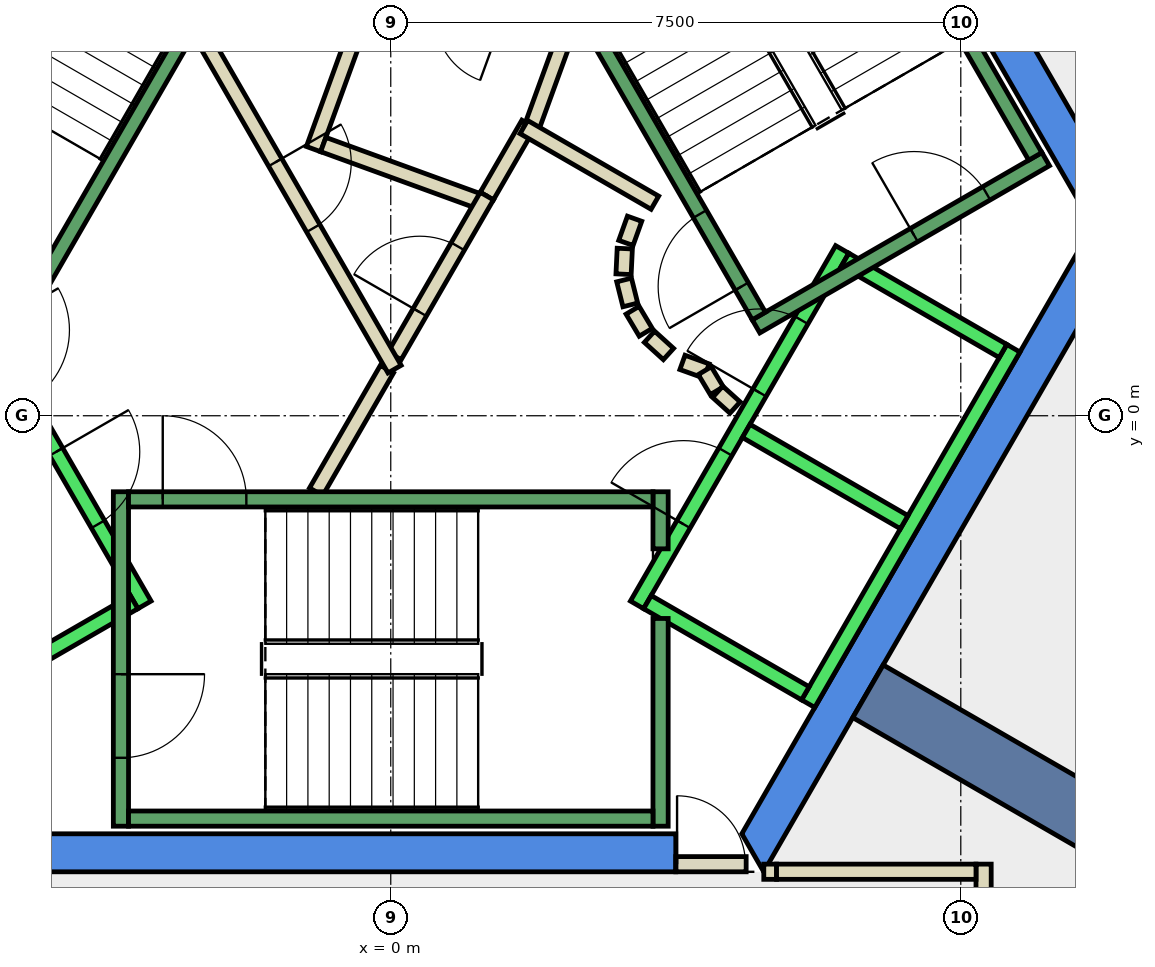
"""IFC4 building model, lengths in metres.
Left out: names, types, materials, properties, quantities, classifications, styles, units other than length and angle.
Written with IfcOpenShell. Run it as: python <this file> out.ifc"""

import sys

from ifc_helpers import new_model, si_unit, direction, frame, frame_2d, origin, place, context, subcontext, project, spatial, polyline, rectangle, outline, extrude, element, fill, save


model = new_model("IFC4")
c1 = context("Model", 3, precision=1e-05, world=origin(), true_north=direction((0.0, 1.0)))
c2 = subcontext(c1, "Body", "Model", "MODEL_VIEW")
j1 = project(units=[si_unit("LENGTHUNIT", "METRE"), si_unit("PLANEANGLEUNIT", "RADIAN")], contexts=[c1])
p1 = place(None, origin())
s1 = spatial("IfcSite", under=j1, at=p1, CompositionType="ELEMENT")
p2 = place(p1, origin())
s2 = spatial("IfcBuilding", under=s1, at=p2, CompositionType="ELEMENT")
p3 = place(p2, frame((0.0, 0.0, 293.6)))
s3 = spatial("IfcBuildingStorey", under=s2, at=p3, CompositionType="ELEMENT", Elevation=293.6)
p4 = place(p3, frame((0.0, 0.0, -0.34)))
e1 = element("IfcWall", 1, at=p4, inside=s3, PredefinedType="SHEAR", context=c2, shape_type="SweptSolid", body=[
    extrude(outline(polyline([(5.486, 9.998), (5.053, 9.748), (9.238, 2.5), (9.815, 2.5), (5.486, 9.998)])), origin(), (0.0, 0.0, 1.0), 3.6),
])
p5 = place(p3, frame((0.0, 0.0, -0.34)))
e2 = element("IfcWall", 2, at=p5, inside=s3, PredefinedType="SHEAR", context=c2, shape_type="SweptSolid", body=[
    extrude(outline(polyline([(3.75, -6.0), (3.75, -5.5), (-4.619, -5.5), (-4.907, -6.0), (3.75, -6.0)])), origin(), (0.0, 0.0, 1.0), 3.6),
])
p6 = place(p3, frame((0.0, 0.0, -0.34)))
e3 = element("IfcWall", 3, at=p6, inside=s3, PredefinedType="SHEAR", context=c2, shape_type="SweptSolid", body=[
    extrude(outline(polyline([(4.907, -6.0), (9.815, 2.5), (9.238, 2.5), (4.619, -5.5), (4.907, -6.0)])), origin(), (0.0, 0.0, 1.0), 3.6),
])
p7 = place(p3, frame((6.279, -3.625, -0.34), z_axis=(0.0, 0.0, 1.0), x_axis=(0.866017533419, -0.500013631625, 0.0)))
e4 = element("IfcWall", 4, at=p7, inside=s3, PredefinedType="SHEAR", context=c2, shape_type="SweptSolid", body=[
    extrude(rectangle(XDim=9.0, YDim=0.8, at=frame_2d((4.5, 0.0))), origin(), (0.0, 0.0, 1.0), 3.6),
])
p8 = place(p3, frame((1.264, 2.89, 0.0), z_axis=(0.0, 0.0, 1.0), x_axis=(0.500043792738, 0.866000118559, 0.0)))
e5 = element("IfcWall", 5, at=p8, inside=s3, PredefinedType="PARTITIONING", context=c2, shape_type="SweptSolid", body=[
    extrude(rectangle(XDim=1.096, YDim=0.2, at=frame_2d((0.548, 0.0))), origin(), (0.0, 0.0, 1.0), 3.26),
])
p9 = place(p3, frame((1.838, 3.748, 0.0), z_axis=(0.0, 0.0, 1.0), x_axis=(0.342266462435, 0.939602931398, 0.0)))
e6 = element("IfcWall", 6, at=p9, inside=s3, PredefinedType="PARTITIONING", context=c2, shape_type="SweptSolid", body=[
    extrude(rectangle(XDim=1.198, YDim=0.2, at=frame_2d((0.599, 0.0))), origin(), (0.0, 0.0, 1.0), 3.26),
])
p10 = place(p3, frame((-0.196, 5.764, 0.0), z_axis=(0.0, 0.0, 1.0), x_axis=(-0.34165322761, -0.939826086073, 0.0)))
e7 = element("IfcWall", 7, at=p10, inside=s3, PredefinedType="PARTITIONING", context=c2, shape_type="SweptSolid", body=[
    extrude(rectangle(XDim=2.4, YDim=0.2, at=frame_2d((1.2, 0.0))), origin(), (0.0, 0.0, 1.0), 3.26),
])
p11 = place(p3, frame((-0.888, 3.568, 0.0), z_axis=(0.0, 0.0, 1.0), x_axis=(0.939685034098, -0.34204098686, 0.0)))
e8 = element("IfcWall", 8, at=p11, inside=s3, PredefinedType="PARTITIONING", context=c2, shape_type="SweptSolid", body=[
    extrude(rectangle(XDim=2.237, YDim=0.2, at=frame_2d((1.119, 0.0))), origin(), (0.0, 0.0, 1.0), 3.26),
])
p12 = place(p3, frame((-0.982, -1.0, 0.0), z_axis=(0.0, 0.0, 1.0), x_axis=(0.50024047865, 0.865886518847, 0.0)))
e9 = element("IfcWall", 9, at=p12, inside=s3, PredefinedType="PARTITIONING", context=c2, shape_type="SweptSolid", body=[
    extrude(rectangle(XDim=1.863, YDim=0.2, at=frame_2d((0.931, 0.0))), origin(), (0.0, 0.0, 1.0), 3.26),
])
p13 = place(p3, frame((0.05, 0.787, 0.0), z_axis=(0.0, 0.0, 1.0), x_axis=(0.499945861543, 0.866056658381, 0.0)))
e10 = element("IfcWall", 10, at=p13, inside=s3, PredefinedType="PARTITIONING", context=c2, shape_type="SweptSolid", body=[
    extrude(rectangle(XDim=2.428, YDim=0.2, at=frame_2d((1.214, 0.0))), origin(), (0.0, 0.0, 1.0), 3.26),
])
p14 = place(p13, frame((0.664, 0.0, 0.0)))
e11 = element("IfcOpeningElement", 11, at=p14, cuts=e10, PredefinedType="OPENING", context=c2, shape_type="SweptSolid", body=[
    extrude(rectangle(XDim=1.0, YDim=2.1, at=frame_2d((0.5, 1.05))), frame((0.0, 0.11, 0.0), z_axis=(0.0, -1.0, 0.0), x_axis=(1.0, 0.0, 0.0)), (0.0, 0.0, 1.0), 0.22),
])
p15 = place(p3, frame((1.751, 3.798, 0.0), z_axis=(0.0, 0.0, 1.0), x_axis=(0.866091650241, -0.499885240213, 0.0)))
e12 = element("IfcWall", 12, at=p15, inside=s3, PredefinedType="PARTITIONING", context=c2, shape_type="SweptSolid", body=[
    extrude(rectangle(XDim=1.991, YDim=0.2, at=frame_2d((0.995, 0.0))), origin(), (0.0, 0.0, 1.0), 3.26),
])
p16 = place(p3, frame((3.208, 2.592, 0.0), z_axis=(0.0, 0.0, 1.0), x_axis=(-0.337388820924, -0.941365382578, 0.0)))
e13 = element("IfcWall", 13, at=p16, inside=s3, PredefinedType="PARTITIONING", context=c2, shape_type="SweptSolid", body=[
    extrude(rectangle(XDim=0.338, YDim=0.2, at=frame_2d((0.169, 0.0))), origin(), (0.0, 0.0, 1.0), 3.26),
])
p17 = place(p3, frame((3.079, 2.199, 0.0), z_axis=(0.0, 0.0, 1.0), x_axis=(-0.047771483479, -0.998858290933, 0.0)))
e14 = element("IfcWall", 14, at=p17, inside=s3, PredefinedType="PARTITIONING", context=c2, shape_type="SweptSolid", body=[
    extrude(rectangle(XDim=0.337, YDim=0.2, at=frame_2d((0.169, 0.0))), origin(), (0.0, 0.0, 1.0), 3.26),
])
p18 = place(p3, frame((3.07, 1.786, 0.0), z_axis=(0.0, 0.0, 1.0), x_axis=(0.242705583207, -0.970099994784, 0.0)))
e15 = element("IfcWall", 15, at=p18, inside=s3, PredefinedType="PARTITIONING", context=c2, shape_type="SweptSolid", body=[
    extrude(rectangle(XDim=0.338, YDim=0.2, at=frame_2d((0.169, 0.0))), origin(), (0.0, 0.0, 1.0), 3.26),
])
for number, where, z_axis, x_axis in (
    (16, (3.182, 1.388, 0.0), (0.0, 0.0, 1.0), (0.512, -0.859, 0.0)),
    (17, (3.404, 1.039, 0.0), (0.0, 0.0, 1.0), (0.74, -0.672, 0.0)),
):
    element("IfcWall", number, at=place(p3, frame(where, z_axis=z_axis, x_axis=x_axis)), inside=s3, PredefinedType="PARTITIONING", context=c2, shape_type="SweptSolid", body=[
        extrude(rectangle(XDim=0.338, YDim=0.2, at=frame_2d((0.169, 0.0))), origin(), (0.0, 0.0, 1.0), 3.26),
    ])
p19 = place(p3, frame((3.838, 0.702, 0.0), z_axis=(0.0, 0.0, 1.0), x_axis=(0.941035081519, -0.338308993895, 0.0)))
e18 = element("IfcWall", 18, at=p19, inside=s3, PredefinedType="PARTITIONING", context=c2, shape_type="SweptSolid", body=[
    extrude(rectangle(XDim=0.337, YDim=0.2, at=frame_2d((0.168, 0.0))), origin(), (0.0, 0.0, 1.0), 3.26),
])
p20 = place(p3, frame((4.132, 0.593, 0.0), z_axis=(0.0, 0.0, 1.0), x_axis=(0.513561617048, -0.858052717201, 0.0)))
e19 = element("IfcWall", 19, at=p20, inside=s3, PredefinedType="PARTITIONING", context=c2, shape_type="SweptSolid", body=[
    extrude(rectangle(XDim=0.308, YDim=0.2, at=frame_2d((0.154, 0.0))), origin(), (0.0, 0.0, 1.0), 3.26),
])
p21 = place(p3, frame((4.301, 0.315, 0.0), z_axis=(0.0, 0.0, 1.0), x_axis=(0.741798017506, -0.670623367639, 0.0)))
e20 = element("IfcWall", 20, at=p21, inside=s3, PredefinedType="PARTITIONING", context=c2, shape_type="SweptSolid", body=[
    extrude(rectangle(XDim=0.309, YDim=0.2, at=frame_2d((0.154, 0.0))), origin(), (0.0, 0.0, 1.0), 3.26),
])
p22 = place(p3, frame((-2.54, 5.1, 0.0), z_axis=(0.0, 0.0, 1.0), x_axis=(0.499925051871, -0.866068670783, 0.0)))
e21 = element("IfcWall", 21, at=p22, inside=s3, PredefinedType="PARTITIONING", context=c2, shape_type="SweptSolid", body=[
    extrude(rectangle(XDim=5.181, YDim=0.2, at=frame_2d((2.59, 0.0))), origin(), (0.0, 0.0, 1.0), 3.26),
])
p23 = place(p22, frame((2.04, 0.0, 0.0)))
e22 = element("IfcOpeningElement", 22, at=p23, cuts=e21, PredefinedType="OPENING", context=c2, shape_type="SweptSolid", body=[
    extrude(rectangle(XDim=1.0, YDim=2.1, at=frame_2d((0.5, 1.05))), frame((0.0, 0.11, 0.0), z_axis=(0.0, -1.0, 0.0), x_axis=(1.0, 0.0, 0.0)), (0.0, 0.0, 1.0), 0.22),
])
p24 = place(p3, frame((4.908, -5.999, 0.0), z_axis=(0.0, 0.0, 1.0), x_axis=(1.0, 0.0, 0.0)))
e23 = element("IfcWall", 23, at=p24, inside=s3, PredefinedType="PARTITIONING", context=c2, shape_type="SweptSolid", body=[
    extrude(rectangle(XDim=0.168, YDim=0.2, at=frame_2d((0.084, 0.0))), origin(), (0.0, 0.0, 1.0), 2.4),
])
p25 = place(p3, frame((7.8, -5.899, 0.0), z_axis=(0.0, 0.0, 1.0), x_axis=(0.0, -1.0, 0.0)))
e24 = element("IfcWall", 24, at=p25, inside=s3, PredefinedType="PARTITIONING", context=c2, shape_type="SweptSolid", body=[
    extrude(rectangle(XDim=3.876, YDim=0.2, at=frame_2d((1.938, 0.0))), origin(), (0.0, 0.0, 1.0), 3.26),
])
p26 = place(p3, frame((3.75, -5.9, 0.0), z_axis=(0.0, 0.0, 1.0), x_axis=(1.0, 0.0, 0.0)))
e25 = element("IfcWall", 25, at=p26, inside=s3, PredefinedType="PARTITIONING", context=c2, shape_type="SweptSolid", body=[
    extrude(rectangle(XDim=0.926, YDim=0.2, at=frame_2d((0.463, 0.0))), origin(), (0.0, 0.0, 1.0), 2.4),
])
p27 = place(p26, frame((0.017, 0.0, 0.0)))
e26 = element("IfcOpeningElement", 26, at=p27, cuts=e25, PredefinedType="OPENING", context=c2, shape_type="SweptSolid", body=[
    extrude(rectangle(XDim=0.9, YDim=2.1, at=frame_2d((0.45, 1.05))), frame((0.0, 0.11, 0.0), z_axis=(0.0, -1.0, 0.0), x_axis=(1.0, 0.0, 0.0)), (0.0, 0.0, 1.0), 0.22),
])
p28 = place(p3, frame((5.076, -5.999, 0.0), z_axis=(0.0, 0.0, 1.0), x_axis=(1.0, 0.0, 0.0)))
e27 = element("IfcWall", 27, at=p28, inside=s3, PredefinedType="PARTITIONING", context=c2, shape_type="SweptSolid", body=[
    extrude(rectangle(XDim=2.624, YDim=0.2, at=frame_2d((1.312, 0.0))), origin(), (0.0, 0.0, 1.0), 3.26),
])
p29 = place(p3, frame((-5.94, 2.188, 0.0), z_axis=(0.0, 0.0, 1.0), x_axis=(0.500034260056, -0.866005622828, 0.0)))
e28 = element("IfcWall", 28, at=p29, inside=s3, PredefinedType="STANDARD", context=c2, shape_type="SweptSolid", body=[
    extrude(rectangle(XDim=5.399, YDim=0.2, at=frame_2d((2.7, 0.0))), origin(), (0.0, 0.0, 1.0), 3.26),
])
p30 = place(p29, frame((3.075, 0.0, 0.0)))
e29 = element("IfcOpeningElement", 29, at=p30, cuts=e28, PredefinedType="OPENING", context=c2, shape_type="SweptSolid", body=[
    extrude(rectangle(XDim=1.1, YDim=2.1, at=frame_2d((0.55, 1.05))), frame((0.0, 0.11, 0.0), z_axis=(0.0, -1.0, 0.0), x_axis=(1.0, 0.0, 0.0)), (0.0, 0.0, 1.0), 0.22),
])
p31 = place(p29, frame((1.225, 0.0, 0.0)))
e30 = element("IfcOpeningElement", 30, at=p31, cuts=e28, PredefinedType="OPENING", context=c2, shape_type="SweptSolid", body=[
    extrude(rectangle(XDim=1.1, YDim=2.1, at=frame_2d((0.55, 1.05))), frame((0.0, 0.11, 0.0), z_axis=(0.0, -1.0, 0.0), x_axis=(1.0, 0.0, 0.0)), (0.0, 0.0, 1.0), 0.22),
])
p32 = place(p3, frame((-3.377, -2.452, 0.0), z_axis=(0.0, 0.0, 1.0), x_axis=(-0.865955154139, -0.50012165622, 0.0)))
e31 = element("IfcWall", 31, at=p32, inside=s3, PredefinedType="STANDARD", context=c2, shape_type="SweptSolid", body=[
    extrude(rectangle(XDim=2.4, YDim=0.2, at=frame_2d((1.2, 0.0))), origin(), (0.0, 0.0, 1.0), 3.26),
])
p33 = place(p3, frame((3.24, -2.488, 0.0), z_axis=(0.0, 0.0, 1.0), x_axis=(0.500034260056, 0.866005622828, 0.0)))
e32 = element("IfcWall", 32, at=p33, inside=s3, PredefinedType="STANDARD", context=c2, shape_type="SweptSolid", body=[
    extrude(rectangle(XDim=5.399, YDim=0.2, at=frame_2d((2.7, 0.0))), origin(), (0.0, 0.0, 1.0), 3.26),
])
p34 = place(p33, frame((3.225, 0.0, 0.0)))
e33 = element("IfcOpeningElement", 33, at=p34, cuts=e32, PredefinedType="OPENING", context=c2, shape_type="SweptSolid", body=[
    extrude(rectangle(XDim=1.1, YDim=2.1, at=frame_2d((0.55, 1.05))), frame((0.0, 0.11, 0.0), z_axis=(0.0, -1.0, 0.0), x_axis=(1.0, 0.0, 0.0)), (0.0, 0.0, 1.0), 0.22),
])
p35 = place(p33, frame((1.225, 0.0, 0.0)))
e34 = element("IfcOpeningElement", 34, at=p35, cuts=e32, PredefinedType="OPENING", context=c2, shape_type="SweptSolid", body=[
    extrude(rectangle(XDim=1.1, YDim=2.1, at=frame_2d((0.55, 1.05))), frame((0.0, 0.11, 0.0), z_axis=(0.0, -1.0, 0.0), x_axis=(1.0, 0.0, 0.0)), (0.0, 0.0, 1.0), 0.22),
])
p36 = place(p3, frame((5.492, -3.788, 0.0), z_axis=(0.0, 0.0, 1.0), x_axis=(0.500034260056, 0.866005622828, 0.0)))
e35 = element("IfcWall", 35, at=p36, inside=s3, PredefinedType="STANDARD", context=c2, shape_type="SweptSolid", body=[
    extrude(rectangle(XDim=5.399, YDim=0.2, at=frame_2d((2.7, 0.0))), origin(), (0.0, 0.0, 1.0), 3.26),
])
p37 = place(p3, frame((3.377, -2.452, 0.0), z_axis=(0.0, 0.0, 1.0), x_axis=(0.865955154139, -0.50012165622, 0.0)))
e36 = element("IfcWall", 36, at=p37, inside=s3, PredefinedType="STANDARD", context=c2, shape_type="SweptSolid", body=[
    extrude(rectangle(XDim=2.4, YDim=0.2, at=frame_2d((1.2, 0.0))), origin(), (0.0, 0.0, 1.0), 3.26),
])
for number, where, z_axis, x_axis in (
    (37, (4.677, -0.2, 0.0), (0.0, 0.0, 1.0), (0.866, -0.5, 0.0)),
    (38, (5.977, 2.052, 0.0), (0.0, 0.0, 1.0), (0.866, -0.5, 0.0)),
):
    element("IfcWall", number, at=place(p3, frame(where, z_axis=z_axis, x_axis=x_axis)), inside=s3, PredefinedType="STANDARD", context=c2, shape_type="SweptSolid", body=[
        extrude(rectangle(XDim=2.399, YDim=0.2, at=frame_2d((1.2, 0.0))), origin(), (0.0, 0.0, 1.0), 3.26),
    ])
p38 = place(p3, frame((-3.55, -1.0, 0.0), z_axis=(0.0, 0.0, 1.0), x_axis=(0.0, -1.0, 0.0)))
e39 = element("IfcWall", 39, at=p38, inside=s3, PredefinedType="STANDARD", context=c2, shape_type="SweptSolid", body=[
    extrude(rectangle(XDim=4.4, YDim=0.2, at=frame_2d((2.2, 0.0))), origin(), (0.0, 0.0, 1.0), 3.26),
])
p39 = place(p38, frame((2.4, 0.0, 0.0)))
e40 = element("IfcOpeningElement", 40, at=p39, cuts=e39, PredefinedType="OPENING", context=c2, shape_type="SweptSolid", body=[
    extrude(rectangle(XDim=1.1, YDim=2.2, at=frame_2d((0.55, 1.1))), frame((0.0, 0.11, 0.0), z_axis=(0.0, -1.0, 0.0), x_axis=(1.0, 0.0, 0.0)), (0.0, 0.0, 1.0), 0.22),
])
p40 = place(p3, frame((3.55, -2.667, 0.0), z_axis=(0.0, 0.0, 1.0), x_axis=(0.0, -1.0, 0.0)))
e41 = element("IfcWall", 41, at=p40, inside=s3, PredefinedType="STANDARD", context=c2, shape_type="SweptSolid", body=[
    extrude(rectangle(XDim=2.733, YDim=0.2, at=frame_2d((1.366, 0.0))), origin(), (0.0, 0.0, 1.0), 3.26),
])
p41 = place(p3, frame((3.55, -1.0, 0.0), z_axis=(0.0, 0.0, 1.0), x_axis=(0.0, -1.0, 0.0)))
e42 = element("IfcWall", 42, at=p41, inside=s3, PredefinedType="STANDARD", context=c2, shape_type="SweptSolid", body=[
    extrude(rectangle(XDim=0.751, YDim=0.2, at=frame_2d((0.375, 0.0))), origin(), (0.0, 0.0, 1.0), 3.26),
])
p42 = place(p3, frame((-3.45, -1.1, 0.0), z_axis=(0.0, 0.0, 1.0), x_axis=(1.0, 0.0, 0.0)))
e43 = element("IfcWall", 43, at=p42, inside=s3, PredefinedType="STANDARD", context=c2, shape_type="SweptSolid", body=[
    extrude(rectangle(XDim=6.9, YDim=0.2, at=frame_2d((3.45, 0.0))), origin(), (0.0, 0.0, 1.0), 3.26),
])
p43 = place(p42, frame((0.45, 0.0, 0.0)))
e44 = element("IfcOpeningElement", 44, at=p43, cuts=e43, PredefinedType="OPENING", context=c2, shape_type="SweptSolid", body=[
    extrude(rectangle(XDim=1.1, YDim=2.2, at=frame_2d((0.55, 1.1))), frame((0.0, 0.11, 0.0), z_axis=(0.0, -1.0, 0.0), x_axis=(1.0, 0.0, 0.0)), (0.0, 0.0, 1.0), 0.22),
])
p44 = place(p3, frame((-3.45, -5.3, 0.0), z_axis=(0.0, 0.0, 1.0), x_axis=(1.0, 0.0, 0.0)))
e45 = element("IfcWall", 45, at=p44, inside=s3, PredefinedType="STANDARD", context=c2, shape_type="SweptSolid", body=[
    extrude(rectangle(XDim=6.9, YDim=0.2, at=frame_2d((3.45, 0.0))), origin(), (0.0, 0.0, 1.0), 3.26),
])
p45 = place(p3, frame((4.806, 1.176, 0.0), z_axis=(0.0, 0.0, 1.0), x_axis=(0.866059941101, 0.499940174841, 0.0)))
e46 = element("IfcWall", 46, at=p45, inside=s3, PredefinedType="STANDARD", context=c2, shape_type="SweptSolid", body=[
    extrude(rectangle(XDim=4.4, YDim=0.2, at=frame_2d((2.2, 0.0))), origin(), (0.0, 0.0, 1.0), 3.26),
])
p46 = place(p45, frame((2.4, 0.0, 0.0)))
e47 = element("IfcOpeningElement", 47, at=p46, cuts=e46, PredefinedType="OPENING", context=c2, shape_type="SweptSolid", body=[
    extrude(rectangle(XDim=1.1, YDim=2.2, at=frame_2d((0.55, 1.1))), frame((0.0, 0.11, 0.0), z_axis=(0.0, -1.0, 0.0), x_axis=(1.0, 0.0, 0.0)), (0.0, 0.0, 1.0), 0.22),
])
p47 = place(p3, frame((4.843, 1.312, 0.0), z_axis=(0.0, 0.0, 1.0), x_axis=(-0.499963383562, 0.866046543262, 0.0)))
e48 = element("IfcWall", 48, at=p47, inside=s3, PredefinedType="STANDARD", context=c2, shape_type="SweptSolid", body=[
    extrude(rectangle(XDim=6.9, YDim=0.2, at=frame_2d((3.45, 0.0))), origin(), (0.0, 0.0, 1.0), 3.26),
])
p48 = place(p47, frame((0.45, 0.0, 0.0)))
e49 = element("IfcOpeningElement", 49, at=p48, cuts=e48, PredefinedType="OPENING", context=c2, shape_type="SweptSolid", body=[
    extrude(rectangle(XDim=1.1, YDim=2.2, at=frame_2d((0.55, 1.1))), frame((0.0, 0.11, 0.0), z_axis=(0.0, -1.0, 0.0), x_axis=(1.0, 0.0, 0.0)), (0.0, 0.0, 1.0), 0.22),
])
p49 = place(p3, frame((8.48, 3.412, 0.0), z_axis=(0.0, 0.0, 1.0), x_axis=(-0.499978703459, 0.866037698999, 0.0)))
e50 = element("IfcWall", 50, at=p49, inside=s3, PredefinedType="STANDARD", context=c2, shape_type="SweptSolid", body=[
    extrude(rectangle(XDim=6.9, YDim=0.2, at=frame_2d((3.45, 0.0))), origin(), (0.0, 0.0, 1.0), 3.26),
])
p50 = place(p3, frame((-1.393, 7.288, 0.0), z_axis=(0.0, 0.0, 1.0), x_axis=(-0.499963383562, -0.866046543262, 0.0)))
e51 = element("IfcWall", 51, at=p50, inside=s3, PredefinedType="STANDARD", context=c2, shape_type="SweptSolid", body=[
    extrude(rectangle(XDim=6.9, YDim=0.2, at=frame_2d((3.45, 0.0))), origin(), (0.0, 0.0, 1.0), 3.26),
])
p51 = place(p50, frame((0.45, 0.0, 0.0)))
e52 = element("IfcOpeningElement", 52, at=p51, cuts=e51, PredefinedType="OPENING", context=c2, shape_type="SweptSolid", body=[
    extrude(rectangle(XDim=1.1, YDim=2.2, at=frame_2d((0.55, 1.1))), frame((0.0, 0.11, 0.0), z_axis=(0.0, -1.0, 0.0), x_axis=(1.0, 0.0, 0.0)), (0.0, 0.0, 1.0), 0.22),
])
p52 = place(p14, origin())
e53 = element("IfcDoor", 53, at=p52, inside=s3, OperationType="SINGLE_SWING_RIGHT", PredefinedType="DOOR", context=c2, shape_type="SweptSolid", body=[
    extrude(rectangle(XDim=1.0, YDim=2.1, at=frame_2d((0.5, 1.05))), frame((0.0, 0.025, 0.0), z_axis=(0.0, -1.0, 0.0), x_axis=(1.0, 0.0, 0.0)), (0.0, 0.0, 1.0), 0.05),
])
fill(e11, e53)
p53 = place(p23, origin())
e54 = element("IfcDoor", 54, at=p53, inside=s3, OperationType="SINGLE_SWING_RIGHT", PredefinedType="DOOR", context=c2, shape_type="SweptSolid", body=[
    extrude(rectangle(XDim=1.0, YDim=2.1, at=frame_2d((0.5, 1.05))), frame((0.0, 0.025, 0.0), z_axis=(0.0, -1.0, 0.0), x_axis=(1.0, 0.0, 0.0)), (0.0, 0.0, 1.0), 0.05),
])
fill(e22, e54)
p54 = place(p27, origin())
e55 = element("IfcDoor", 55, at=p54, inside=s3, OperationType="SINGLE_SWING_LEFT", PredefinedType="DOOR", context=c2, shape_type="SweptSolid", body=[
    extrude(rectangle(XDim=0.9, YDim=2.1, at=frame_2d((0.45, 1.05))), frame((0.0, 0.025, 0.0), z_axis=(0.0, -1.0, 0.0), x_axis=(1.0, 0.0, 0.0)), (0.0, 0.0, 1.0), 0.05),
])
fill(e26, e55)
p55 = place(p34, origin())
e56 = element("IfcDoor", 56, at=p55, inside=s3, OperationType="SLIDING_TO_LEFT", PredefinedType="DOOR", context=c2, shape_type="SweptSolid", body=[
    extrude(rectangle(XDim=1.1, YDim=2.1, at=frame_2d((0.55, 1.05))), frame((0.0, 0.025, 0.0), z_axis=(0.0, -1.0, 0.0), x_axis=(1.0, 0.0, 0.0)), (0.0, 0.0, 1.0), 0.05),
])
fill(e33, e56)
p56 = place(p30, origin())
e57 = element("IfcDoor", 57, at=p56, inside=s3, OperationType="SLIDING_TO_LEFT", PredefinedType="DOOR", context=c2, shape_type="SweptSolid", body=[
    extrude(rectangle(XDim=1.1, YDim=2.1, at=frame_2d((0.55, 1.05))), frame((0.0, 0.025, 0.0), z_axis=(0.0, -1.0, 0.0), x_axis=(1.0, 0.0, 0.0)), (0.0, 0.0, 1.0), 0.05),
])
fill(e29, e57)
p57 = place(p35, origin())
e58 = element("IfcDoor", 58, at=p57, inside=s3, OperationType="SLIDING_TO_LEFT", PredefinedType="DOOR", context=c2, shape_type="SweptSolid", body=[
    extrude(rectangle(XDim=1.1, YDim=2.1, at=frame_2d((0.55, 1.05))), frame((0.0, 0.025, 0.0), z_axis=(0.0, -1.0, 0.0), x_axis=(1.0, 0.0, 0.0)), (0.0, 0.0, 1.0), 0.05),
])
fill(e34, e58)
p58 = place(p43, origin())
e59 = element("IfcDoor", 59, at=p58, inside=s3, OperationType="SINGLE_SWING_LEFT", PredefinedType="DOOR", context=c2, shape_type="SweptSolid", body=[
    extrude(rectangle(XDim=1.1, YDim=2.2, at=frame_2d((0.55, 1.1))), frame((0.0, 0.025, 0.0), z_axis=(0.0, -1.0, 0.0), x_axis=(1.0, 0.0, 0.0)), (0.0, 0.0, 1.0), 0.05),
])
fill(e44, e59)
p59 = place(p39, origin())
e60 = element("IfcDoor", 60, at=p59, inside=s3, OperationType="SINGLE_SWING_LEFT", PredefinedType="DOOR", context=c2, shape_type="SweptSolid", body=[
    extrude(rectangle(XDim=1.1, YDim=2.2, at=frame_2d((0.55, 1.1))), frame((0.0, 0.025, 0.0), z_axis=(0.0, -1.0, 0.0), x_axis=(1.0, 0.0, 0.0)), (0.0, 0.0, 1.0), 0.05),
])
fill(e40, e60)
p60 = place(p48, origin())
e61 = element("IfcDoor", 61, at=p60, inside=s3, OperationType="SINGLE_SWING_LEFT", PredefinedType="DOOR", context=c2, shape_type="SweptSolid", body=[
    extrude(rectangle(XDim=1.1, YDim=2.2, at=frame_2d((0.55, 1.1))), frame((0.0, 0.025, 0.0), z_axis=(0.0, -1.0, 0.0), x_axis=(1.0, 0.0, 0.0)), (0.0, 0.0, 1.0), 0.05),
])
fill(e49, e61)
p61 = place(p46, origin())
e62 = element("IfcDoor", 62, at=p61, inside=s3, OperationType="SINGLE_SWING_LEFT", PredefinedType="DOOR", context=c2, shape_type="SweptSolid", body=[
    extrude(rectangle(XDim=1.1, YDim=2.2, at=frame_2d((0.55, 1.1))), frame((0.0, 0.025, 0.0), z_axis=(0.0, -1.0, 0.0), x_axis=(1.0, 0.0, 0.0)), (0.0, 0.0, 1.0), 0.05),
])
fill(e47, e62)
save(model, sys.argv[1])
